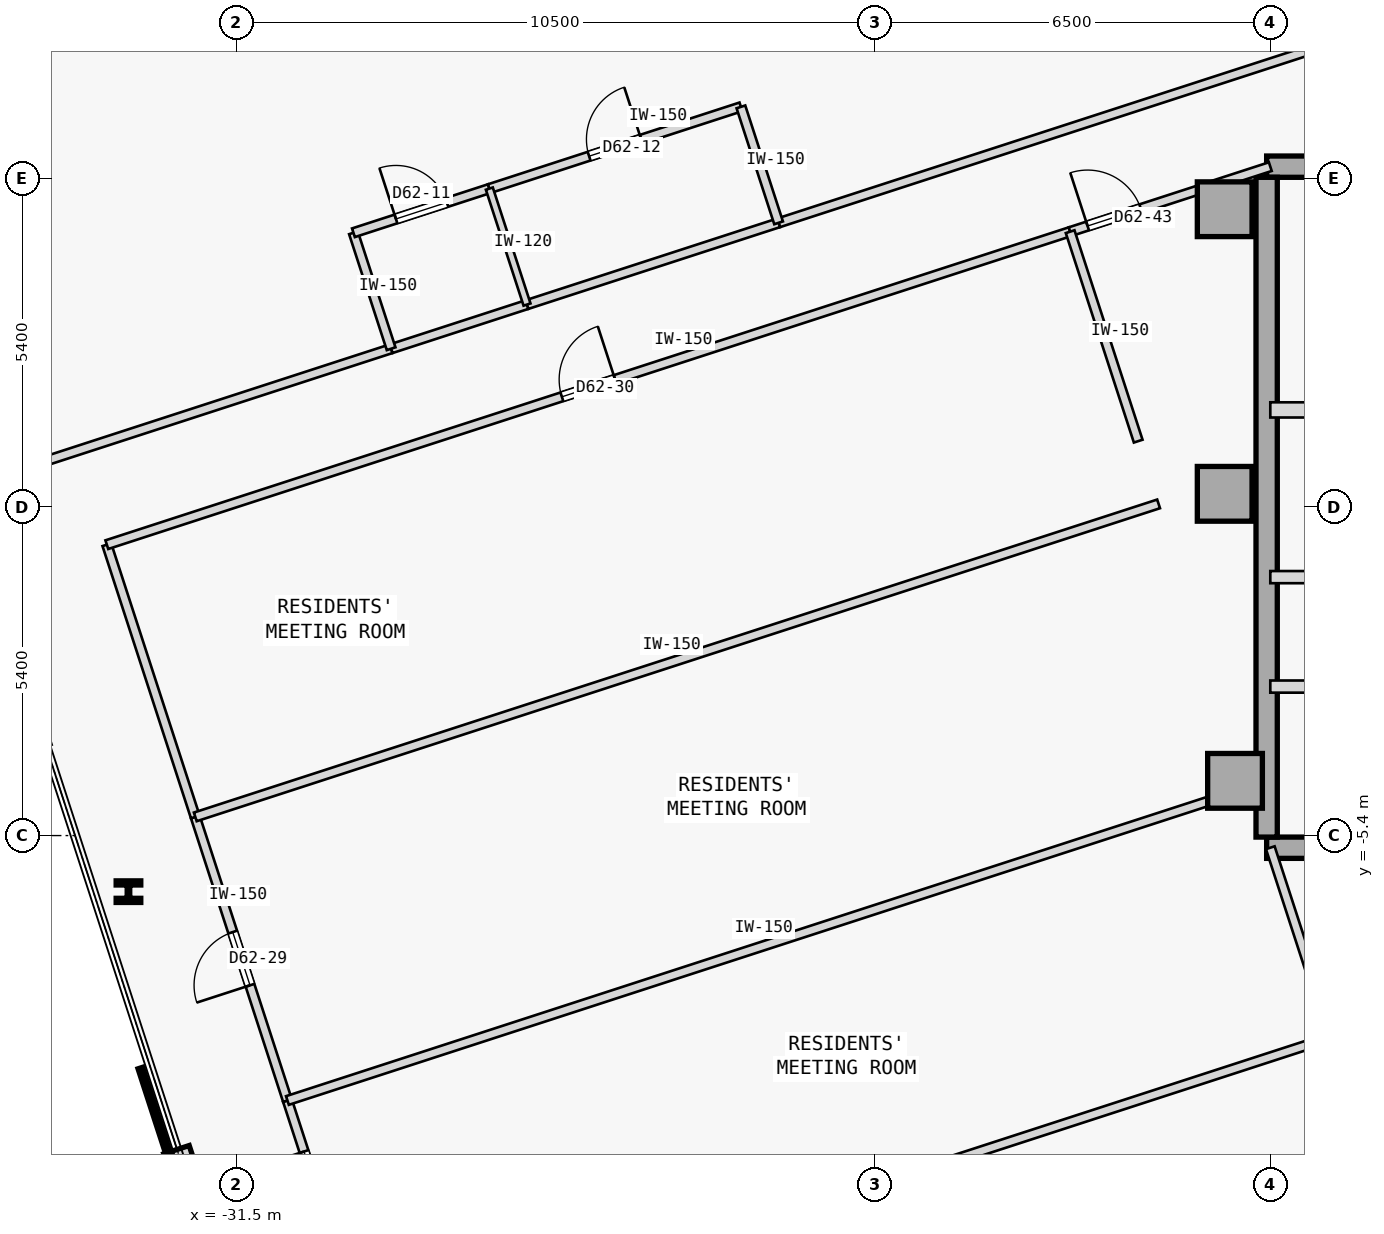
"""IFC4 building model, lengths in metres.
Left out: names, types, materials, properties, quantities, classifications, styles, units other than length and angle.
Written with IfcOpenShell. Run it as: python <this file> out.ifc"""

import sys

from ifc_helpers import new_model, si_unit, direction, frame, frame_2d, origin, origin_2d, place, context, subcontext, project, spatial, rectangle, i_section, extrude, element, fill, save


model = new_model("IFC4")
c1 = context("Model", 3, precision=1e-05, world=origin(), true_north=direction((0.0, 1.0)))
c2 = subcontext(c1, "Body", "Model", "MODEL_VIEW")
j1 = project(units=[si_unit("LENGTHUNIT", "METRE"), si_unit("PLANEANGLEUNIT", "RADIAN")], contexts=[c1])
p1 = place(None, origin())
s1 = spatial("IfcSite", under=j1, at=p1, CompositionType="ELEMENT")
p2 = place(p1, origin())
s2 = spatial("IfcBuilding", under=s1, at=p2, CompositionType="ELEMENT")
p3 = place(p2, frame((0.0, 0.0, 234.35)))
s3 = spatial("IfcBuildingStorey", under=s2, at=p3, CompositionType="ELEMENT", Elevation=234.35)
for number, where, z_axis, x_axis in (
    (1, (-15.25, 4.9, 0.0), (0.0, 0.0, 1.0), (1.0, 0.0, 0.0)),
    (2, (-15.25, 0.22, 0.0), (0.0, 0.0, 1.0), (1.0, 0.0, 0.0)),
    (3, (-15.08, -4.5, 0.0), (0.0, 0.0, 1.0), (1.0, 0.0, 0.0)),
):
    element("IfcColumn", number, at=place(p3, frame(where, z_axis=z_axis, x_axis=x_axis)), inside=s3, PredefinedType="COLUMN", context=c2, shape_type="SweptSolid", body=[
        extrude(rectangle(XDim=0.9, YDim=0.9, at=origin_2d()), origin(), (0.0, 0.0, 1.0), 3.35),
    ])
p4 = place(p3, frame((-14.56, 5.6, 0.0), z_axis=(0.0, 0.0, 1.0), x_axis=(1.0, 0.0, 0.0)))
e4 = element("IfcWall", 4, at=p4, inside=s3, PredefinedType="SHEAR", context=c2, shape_type="SweptSolid", body=[
    extrude(rectangle(XDim=11.41, YDim=0.35, at=frame_2d((5.705, 0.0))), origin(), (0.0, 0.0, 1.0), 3.125),
])
p5 = place(p3, frame((-14.56, -5.6, 0.0), z_axis=(0.0, 0.0, 1.0), x_axis=(1.0, 0.0, 0.0)))
e5 = element("IfcWall", 5, at=p5, inside=s3, PredefinedType="SHEAR", context=c2, shape_type="SweptSolid", body=[
    extrude(rectangle(XDim=10.86, YDim=0.35, at=frame_2d((5.43, 0.0))), origin(), (0.0, 0.0, 1.0), 3.125),
])
p6 = place(p3, frame((-14.56, -5.425, 0.0), z_axis=(0.0, 0.0, 1.0), x_axis=(0.0, 1.0, 0.0)))
e6 = element("IfcWall", 6, at=p6, inside=s3, PredefinedType="SHEAR", context=c2, shape_type="SweptSolid", body=[
    extrude(rectangle(XDim=10.85, YDim=0.35, at=frame_2d((5.425, 0.0))), origin(), (0.0, 0.0, 1.0), 3.125),
])
p7 = place(p3, frame((-33.278, -6.322, 0.0), z_axis=(0.0, 0.0, 1.0), x_axis=(1.0, 0.0, 0.0)))
e7 = element("IfcColumn", 7, at=p7, inside=s3, PredefinedType="COLUMN", context=c2, shape_type="SweptSolid", body=[
    extrude(i_section(OverallWidth=0.405, OverallDepth=0.355, WebThickness=0.042, FlangeThickness=0.068, FilletRadius=0.015, at=origin_2d()), origin(), (0.0, 0.0, 1.0), 3.35),
])
p8 = place(p3, frame((-14.5, 1.6, 0.0), z_axis=(0.0, 0.0, 1.0), x_axis=(1.0, 0.0, 0.0)))
e8 = element("IfcWall", 8, at=p8, inside=s3, PredefinedType="STANDARD", context=c2, shape_type="SweptSolid", body=[
    extrude(rectangle(XDim=3.6, YDim=0.25, at=frame_2d((1.8, 0.0))), origin(), (0.0, 0.0, 1.0), 3.125),
])
p9 = place(p8, frame((0.92, 0.0, 0.0)))
e9 = element("IfcOpeningElement", 9, at=p9, cuts=e8, PredefinedType="OPENING", context=c2, shape_type="SweptSolid", body=[
    extrude(rectangle(XDim=1.05, YDim=2.15, at=frame_2d((0.525, 1.075))), frame((0.0, 0.135, 0.0), z_axis=(0.0, -1.0, 0.0), x_axis=(1.0, 0.0, 0.0)), (0.0, 0.0, 1.0), 0.27),
])
p10 = place(p3, frame((-14.5, -1.15, 0.0), z_axis=(0.0, 0.0, 1.0), x_axis=(1.0, 0.0, 0.0)))
e10 = element("IfcWall", 10, at=p10, inside=s3, PredefinedType="STANDARD", context=c2, shape_type="SweptSolid", body=[
    extrude(rectangle(XDim=2.95, YDim=0.2, at=frame_2d((1.475, 0.0))), origin(), (0.0, 0.0, 1.0), 3.125),
])
p11 = place(p10, frame((0.75, 0.0, 0.0)))
e11 = element("IfcOpeningElement", 11, at=p11, cuts=e10, PredefinedType="OPENING", context=c2, shape_type="SweptSolid", body=[
    extrude(rectangle(XDim=1.05, YDim=2.18, at=frame_2d((0.525, 1.09))), frame((0.0, 0.11, 0.0), z_axis=(0.0, -1.0, 0.0), x_axis=(1.0, 0.0, 0.0)), (0.0, 0.0, 1.0), 0.22),
])
p12 = place(p3, frame((-14.5, -2.95, 0.0), z_axis=(0.0, 0.0, 1.0), x_axis=(1.0, 0.0, 0.0)))
e12 = element("IfcWall", 12, at=p12, inside=s3, PredefinedType="STANDARD", context=c2, shape_type="SweptSolid", body=[
    extrude(rectangle(XDim=10.8, YDim=0.2, at=frame_2d((5.4, 0.0))), origin(), (0.0, 0.0, 1.0), 3.125),
])
p13 = place(p12, frame((9.17, 0.0, 0.0)))
e13 = element("IfcOpeningElement", 13, at=p13, cuts=e12, PredefinedType="OPENING", context=c2, shape_type="SweptSolid", body=[
    extrude(rectangle(XDim=1.1, YDim=2.15, at=frame_2d((0.55, 1.075))), frame((0.0, 0.11, 0.0), z_axis=(0.0, -1.0, 0.0), x_axis=(1.0, 0.0, 0.0)), (0.0, 0.0, 1.0), 0.22),
])
p14 = place(p12, frame((1.73, 0.0, 0.0)))
e14 = element("IfcOpeningElement", 14, at=p14, cuts=e12, PredefinedType="OPENING", context=c2, shape_type="SweptSolid", body=[
    extrude(rectangle(XDim=0.92, YDim=2.15, at=frame_2d((0.46, 1.075))), frame((0.0, 0.11, 0.0), z_axis=(0.0, -1.0, 0.0), x_axis=(1.0, 0.0, 0.0)), (0.0, 0.0, 1.0), 0.22),
])
p15 = place(p12, frame((6.05, 0.0, 0.0)))
e15 = element("IfcOpeningElement", 15, at=p15, cuts=e12, PredefinedType="OPENING", context=c2, shape_type="SweptSolid", body=[
    extrude(rectangle(XDim=0.92, YDim=2.15, at=frame_2d((0.46, 1.075))), frame((0.0, 0.11, 0.0), z_axis=(0.0, -1.0, 0.0), x_axis=(1.0, 0.0, 0.0)), (0.0, 0.0, 1.0), 0.22),
])
p16 = place(p3, frame((-36.012, 0.314, 0.0), z_axis=(0.0, 0.0, 1.0), x_axis=(0.951055595173, 0.309019829283, 0.0)))
e16 = element("IfcWall", 16, at=p16, inside=s3, PredefinedType="PARTITIONING", context=c2, shape_type="SweptSolid", body=[
    extrude(rectangle(XDim=7.417, YDim=0.15, at=frame_2d((3.708, 0.0))), origin(), (0.0, 0.0, 1.0), 3.125),
])
p17 = place(p3, frame((-22.586, 4.677, 0.0), z_axis=(0.0, 0.0, 1.0), x_axis=(0.951057743275, 0.309013218095, 0.0)))
e17 = element("IfcWall", 17, at=p17, inside=s3, PredefinedType="PARTITIONING", context=c2, shape_type="SweptSolid", body=[
    extrude(rectangle(XDim=19.171, YDim=0.15, at=frame_2d((9.585, 0.0))), origin(), (0.0, 0.0, 1.0), 3.125),
])
p18 = place(p17, frame((9.111, 0.0, 0.0)))
e18 = element("IfcOpeningElement", 18, at=p18, cuts=e17, PredefinedType="OPENING", context=c2, shape_type="SweptSolid", body=[
    extrude(rectangle(XDim=0.95, YDim=2.15, at=frame_2d((0.475, 1.075))), frame((0.0, 0.085, 0.0), z_axis=(0.0, -1.0, 0.0), x_axis=(1.0, 0.0, 0.0)), (0.0, 0.0, 1.0), 0.17),
])
p19 = place(p3, frame((-28.958, 2.606, 0.0), z_axis=(0.0, 0.0, 1.0), x_axis=(0.951076048914, 0.308956872689, 0.0)))
e19 = element("IfcWall", 19, at=p19, inside=s3, PredefinedType="PARTITIONING", context=c2, shape_type="SweptSolid", body=[
    extrude(rectangle(XDim=2.35, YDim=0.15, at=frame_2d((1.175, 0.0))), origin(), (0.0, 0.0, 1.0), 3.125),
])
p20 = place(p3, frame((-26.723, 3.332, 0.0), z_axis=(0.0, 0.0, 1.0), x_axis=(0.951052627573, 0.309028962374, 0.0)))
e20 = element("IfcWall", 20, at=p20, inside=s3, PredefinedType="PARTITIONING", context=c2, shape_type="SweptSolid", body=[
    extrude(rectangle(XDim=4.35, YDim=0.15, at=frame_2d((2.175, 0.0))), origin(), (0.0, 0.0, 1.0), 3.125),
])
p21 = place(p3, frame((-29.833, -12.311, 0.0), z_axis=(0.0, 0.0, 1.0), x_axis=(-0.309044953986, 0.951047431213, 0.0)))
e21 = element("IfcWall", 21, at=p21, inside=s3, PredefinedType="PARTITIONING", context=c2, shape_type="SweptSolid", body=[
    extrude(rectangle(XDim=2.685, YDim=0.15, at=frame_2d((1.343, 0.0))), origin(), (0.0, 0.0, 1.0), 3.125),
])
p22 = place(p21, frame((0.883, 0.0, 0.0)))
e22 = element("IfcOpeningElement", 22, at=p22, cuts=e21, PredefinedType="OPENING", context=c2, shape_type="SweptSolid", body=[
    extrude(rectangle(XDim=0.92, YDim=2.15, at=frame_2d((0.46, 1.075))), frame((0.0, 0.085, 0.0), z_axis=(0.0, -1.0, 0.0), x_axis=(1.0, 0.0, 0.0)), (0.0, 0.0, 1.0), 0.17),
])
p23 = place(p3, frame((-30.663, -9.757, 0.0), z_axis=(0.0, 0.0, 1.0), x_axis=(-0.309019653166, 0.951055652397, 0.0)))
e23 = element("IfcWall", 23, at=p23, inside=s3, PredefinedType="PARTITIONING", context=c2, shape_type="SweptSolid", body=[
    extrude(rectangle(XDim=4.904, YDim=0.15, at=frame_2d((2.452, 0.0))), origin(), (0.0, 0.0, 1.0), 3.125),
])
p24 = place(p23, frame((1.992, 0.0, 0.0)))
e24 = element("IfcOpeningElement", 24, at=p24, cuts=e23, PredefinedType="OPENING", context=c2, shape_type="SweptSolid", body=[
    extrude(rectangle(XDim=0.92, YDim=2.15, at=frame_2d((0.46, 1.075))), frame((0.0, 0.085, 0.0), z_axis=(0.0, -1.0, 0.0), x_axis=(1.0, 0.0, 0.0)), (0.0, 0.0, 1.0), 0.17),
])
p25 = place(p3, frame((-32.179, -5.093, 0.0), z_axis=(0.0, 0.0, 1.0), x_axis=(-0.309014532869, 0.951057316083, 0.0)))
e25 = element("IfcWall", 25, at=p25, inside=s3, PredefinedType="PARTITIONING", context=c2, shape_type="SweptSolid", body=[
    extrude(rectangle(XDim=4.707, YDim=0.15, at=frame_2d((2.354, 0.0))), origin(), (0.0, 0.0, 1.0), 3.125),
])
p26 = place(p3, frame((-33.633, -0.616, 0.0), z_axis=(0.0, 0.0, 1.0), x_axis=(0.951058192995, 0.309011833974, 0.0)))
e26 = element("IfcWall", 26, at=p26, inside=s3, PredefinedType="PARTITIONING", context=c2, shape_type="SweptSolid", body=[
    extrude(rectangle(XDim=16.657, YDim=0.15, at=frame_2d((8.329, 0.0))), origin(), (0.0, 0.0, 1.0), 3.125),
])
p27 = place(p26, frame((7.868, 0.0, 0.0)))
e27 = element("IfcOpeningElement", 27, at=p27, cuts=e26, PredefinedType="OPENING", context=c2, shape_type="SweptSolid", body=[
    extrude(rectangle(XDim=0.92, YDim=2.15, at=frame_2d((0.46, 1.075))), frame((0.0, 0.085, 0.0), z_axis=(0.0, -1.0, 0.0), x_axis=(1.0, 0.0, 0.0)), (0.0, 0.0, 1.0), 0.17),
])
p28 = place(p3, frame((-17.792, 4.531, 0.0), z_axis=(0.0, 0.0, 1.0), x_axis=(0.951047546178, 0.309044600193, 0.0)))
e28 = element("IfcWall", 28, at=p28, inside=s3, PredefinedType="PARTITIONING", context=c2, shape_type="SweptSolid", body=[
    extrude(rectangle(XDim=3.461, YDim=0.15, at=frame_2d((1.73, 0.0))), origin(), (0.0, 0.0, 1.0), 3.125),
])
p29 = place(p28, frame((0.302, 0.0, 0.0)))
e29 = element("IfcOpeningElement", 29, at=p29, cuts=e28, PredefinedType="OPENING", context=c2, shape_type="SweptSolid", body=[
    extrude(rectangle(XDim=0.92, YDim=2.15, at=frame_2d((0.46, 1.075))), frame((0.0, 0.085, 0.0), z_axis=(0.0, -1.0, 0.0), x_axis=(1.0, 0.0, 0.0)), (0.0, 0.0, 1.0), 0.17),
])
p30 = place(p3, frame((-28.958, 2.606, 0.0), z_axis=(0.0, 0.0, 1.0), x_axis=(-0.309058537449, 0.951043017129, 0.0)))
e30 = element("IfcWall", 30, at=p30, inside=s3, PredefinedType="PARTITIONING", context=c2, shape_type="SweptSolid", body=[
    extrude(rectangle(XDim=2.005, YDim=0.15, at=frame_2d((1.002, 0.0))), origin(), (0.0, 0.0, 1.0), 3.125),
])
p31 = place(p3, frame((-29.578, 4.513, 0.0), z_axis=(0.0, 0.0, 1.0), x_axis=(0.951076048914, 0.308956872689, 0.0)))
e31 = element("IfcWall", 31, at=p31, inside=s3, PredefinedType="PARTITIONING", context=c2, shape_type="SweptSolid", body=[
    extrude(rectangle(XDim=2.35, YDim=0.15, at=frame_2d((1.175, 0.0))), origin(), (0.0, 0.0, 1.0), 3.125),
])
p32 = place(p31, frame((0.735, 0.0, 0.0)))
e32 = element("IfcOpeningElement", 32, at=p32, cuts=e31, PredefinedType="OPENING", context=c2, shape_type="SweptSolid", body=[
    extrude(rectangle(XDim=0.88, YDim=2.15, at=frame_2d((0.44, 1.075))), frame((0.0, 0.085, 0.0), z_axis=(0.0, -1.0, 0.0), x_axis=(1.0, 0.0, 0.0)), (0.0, 0.0, 1.0), 0.17),
])
p33 = place(p3, frame((-27.343, 5.239, 0.0), z_axis=(0.0, 0.0, 1.0), x_axis=(0.951036130958, 0.309079726951, 0.0)))
e33 = element("IfcWall", 33, at=p33, inside=s3, PredefinedType="PARTITIONING", context=c2, shape_type="SweptSolid", body=[
    extrude(rectangle(XDim=4.35, YDim=0.15, at=frame_2d((2.175, 0.0))), origin(), (0.0, 0.0, 1.0), 3.125),
])
p34 = place(p33, frame((1.725, 0.0, 0.0)))
e34 = element("IfcOpeningElement", 34, at=p34, cuts=e33, PredefinedType="OPENING", context=c2, shape_type="SweptSolid", body=[
    extrude(rectangle(XDim=0.9, YDim=2.15, at=frame_2d((0.45, 1.075))), frame((0.0, 0.085, 0.0), z_axis=(0.0, -1.0, 0.0), x_axis=(1.0, 0.0, 0.0)), (0.0, 0.0, 1.0), 0.17),
])
p35 = place(p3, frame((-22.586, 4.677, 0.0), z_axis=(0.0, 0.0, 1.0), x_axis=(-0.309022749039, 0.951054646472, 0.0)))
e35 = element("IfcWall", 35, at=p35, inside=s3, PredefinedType="PARTITIONING", context=c2, shape_type="SweptSolid", body=[
    extrude(rectangle(XDim=2.005, YDim=0.15, at=frame_2d((1.002, 0.0))), origin(), (0.0, 0.0, 1.0), 3.125),
])
p36 = place(p3, frame((-26.723, 3.332, 0.0), z_axis=(0.0, 0.0, 1.0), x_axis=(-0.309058537449, 0.951043017129, 0.0)))
e36 = element("IfcWall", 36, at=p36, inside=s3, PredefinedType="PARTITIONING", context=c2, shape_type="SweptSolid", body=[
    extrude(rectangle(XDim=2.005, YDim=0.12, at=frame_2d((1.002, 0.0))), origin(), (0.0, 0.0, 1.0), 3.125),
])
p37 = place(p3, frame((-31.208, -14.471, 0.0), z_axis=(0.0, 0.0, 1.0), x_axis=(0.951057753948, 0.309013185244, 0.0)))
e37 = element("IfcWall", 37, at=p37, inside=s3, PredefinedType="PARTITIONING", context=c2, shape_type="SweptSolid", body=[
    extrude(rectangle(XDim=18.632, YDim=0.15, at=frame_2d((9.316, 0.0))), origin(), (0.0, 0.0, 1.0), 3.125),
])
p38 = place(p3, frame((-30.663, -9.757, 0.0), z_axis=(0.0, 0.0, 1.0), x_axis=(0.951058192995, 0.309011833974, 0.0)))
e38 = element("IfcWall", 38, at=p38, inside=s3, PredefinedType="PARTITIONING", context=c2, shape_type="SweptSolid", body=[
    extrude(rectangle(XDim=16.657, YDim=0.15, at=frame_2d((8.329, 0.0))), origin(), (0.0, 0.0, 1.0), 3.125),
])
p39 = place(p3, frame((-13.488, -8.713, 0.0), z_axis=(0.0, 0.0, 1.0), x_axis=(-0.309082700143, 0.951035164687, 0.0)))
e39 = element("IfcWall", 39, at=p39, inside=s3, PredefinedType="PARTITIONING", context=c2, shape_type="SweptSolid", body=[
    extrude(rectangle(XDim=3.274, YDim=0.15, at=frame_2d((1.637, 0.0))), origin(), (0.0, 0.0, 1.0), 3.125),
])
p40 = place(p3, frame((-32.179, -5.093, 0.0), z_axis=(0.0, 0.0, 1.0), x_axis=(0.951053885426, 0.309025091239, 0.0)))
e40 = element("IfcWall", 40, at=p40, inside=s3, PredefinedType="PARTITIONING", context=c2, shape_type="SweptSolid", body=[
    extrude(rectangle(XDim=16.657, YDim=0.15, at=frame_2d((8.329, 0.0))), origin(), (0.0, 0.0, 1.0), 3.125),
])
p41 = place(p3, frame((-16.672, 1.086, 0.0), z_axis=(0.0, 0.0, 1.0), x_axis=(-0.308979382511, 0.951068736308, 0.0)))
e41 = element("IfcWall", 41, at=p41, inside=s3, PredefinedType="PARTITIONING", context=c2, shape_type="SweptSolid", body=[
    extrude(rectangle(XDim=3.622, YDim=0.15, at=frame_2d((1.811, 0.0))), origin(), (0.0, 0.0, 1.0), 3.125),
])
p42 = place(p18, origin())
e42 = element("IfcDoor", 42, at=p42, inside=s3, OperationType="SINGLE_SWING_RIGHT", PredefinedType="DOOR", context=c2, shape_type="SweptSolid", body=[
    extrude(rectangle(XDim=0.95, YDim=2.15, at=frame_2d((0.475, 1.075))), frame((0.0, 0.025, 0.0), z_axis=(0.0, -1.0, 0.0), x_axis=(1.0, 0.0, 0.0)), (0.0, 0.0, 1.0), 0.05),
])
fill(e18, e42)
p43 = place(p32, origin())
e43 = element("IfcDoor", 43, at=p43, inside=s3, OperationType="SINGLE_SWING_LEFT", PredefinedType="DOOR", context=c2, shape_type="SweptSolid", body=[
    extrude(rectangle(XDim=0.88, YDim=2.15, at=frame_2d((0.44, 1.075))), frame((0.0, 0.025, 0.0), z_axis=(0.0, -1.0, 0.0), x_axis=(1.0, 0.0, 0.0)), (0.0, 0.0, 1.0), 0.05),
])
fill(e32, e43)
p44 = place(p34, origin())
e44 = element("IfcDoor", 44, at=p44, inside=s3, OperationType="SINGLE_SWING_RIGHT", PredefinedType="DOOR", context=c2, shape_type="SweptSolid", body=[
    extrude(rectangle(XDim=0.9, YDim=2.15, at=frame_2d((0.45, 1.075))), frame((0.0, 0.025, 0.0), z_axis=(0.0, -1.0, 0.0), x_axis=(1.0, 0.0, 0.0)), (0.0, 0.0, 1.0), 0.05),
])
fill(e34, e44)
p45 = place(p22, origin())
e45 = element("IfcDoor", 45, at=p45, inside=s3, OperationType="SINGLE_SWING_RIGHT", PredefinedType="DOOR", context=c2, shape_type="SweptSolid", body=[
    extrude(rectangle(XDim=0.92, YDim=2.15, at=frame_2d((0.46, 1.075))), frame((0.0, 0.025, 0.0), z_axis=(0.0, -1.0, 0.0), x_axis=(1.0, 0.0, 0.0)), (0.0, 0.0, 1.0), 0.05),
])
fill(e22, e45)
p46 = place(p24, origin())
e46 = element("IfcDoor", 46, at=p46, inside=s3, OperationType="SINGLE_SWING_LEFT", PredefinedType="DOOR", context=c2, shape_type="SweptSolid", body=[
    extrude(rectangle(XDim=0.92, YDim=2.15, at=frame_2d((0.46, 1.075))), frame((0.0, 0.025, 0.0), z_axis=(0.0, -1.0, 0.0), x_axis=(1.0, 0.0, 0.0)), (0.0, 0.0, 1.0), 0.05),
])
fill(e24, e46)
p47 = place(p27, origin())
e47 = element("IfcDoor", 47, at=p47, inside=s3, OperationType="SINGLE_SWING_RIGHT", PredefinedType="DOOR", context=c2, shape_type="SweptSolid", body=[
    extrude(rectangle(XDim=0.92, YDim=2.15, at=frame_2d((0.46, 1.075))), frame((0.0, 0.025, 0.0), z_axis=(0.0, -1.0, 0.0), x_axis=(1.0, 0.0, 0.0)), (0.0, 0.0, 1.0), 0.05),
])
fill(e27, e47)
p48 = place(p29, origin())
e48 = element("IfcDoor", 48, at=p48, inside=s3, OperationType="SINGLE_SWING_LEFT", PredefinedType="DOOR", context=c2, shape_type="SweptSolid", body=[
    extrude(rectangle(XDim=0.92, YDim=2.15, at=frame_2d((0.46, 1.075))), frame((0.0, 0.025, 0.0), z_axis=(0.0, -1.0, 0.0), x_axis=(1.0, 0.0, 0.0)), (0.0, 0.0, 1.0), 0.05),
])
fill(e29, e48)
save(model, sys.argv[1])
